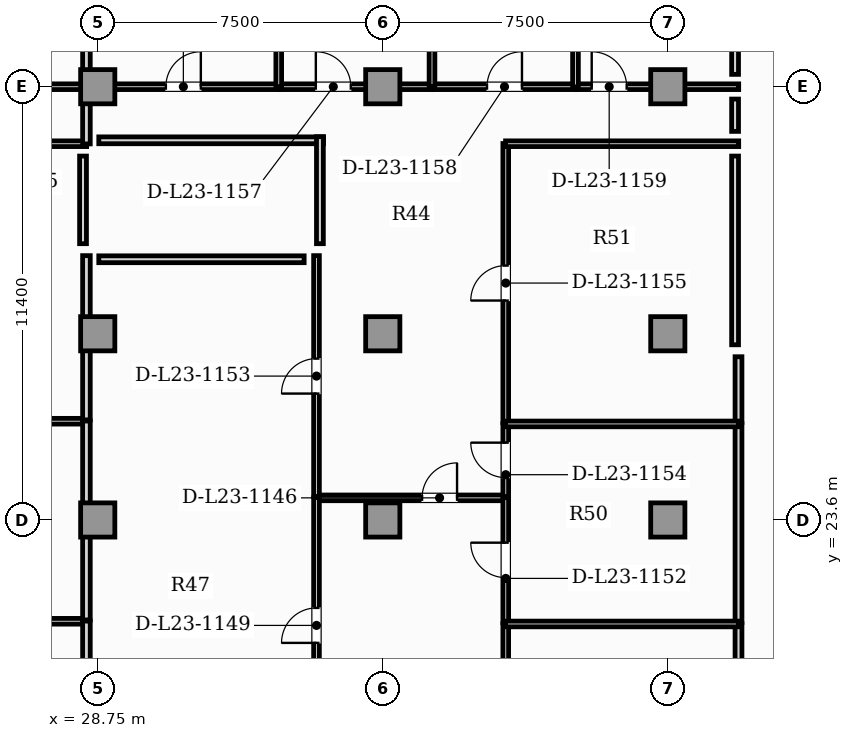
"""IFC4 building model, lengths in metres.
Left out: names, types, materials, properties, quantities, classifications, styles, units other than length and angle.
Written with IfcOpenShell. Run it as: python <this file> out.ifc"""

import sys

from ifc_helpers import new_model, si_unit, direction, frame, frame_2d, origin, origin_2d, place, context, subcontext, project, spatial, rectangle, extrude, element, fill, save


model = new_model("IFC4")
c1 = context("Model", 3, precision=1e-05, world=origin(), true_north=direction((0.0, 1.0)))
c2 = subcontext(c1, "Body", "Model", "MODEL_VIEW")
j1 = project(units=[si_unit("LENGTHUNIT", "METRE"), si_unit("PLANEANGLEUNIT", "RADIAN")], contexts=[c1])
p1 = place(None, origin())
s1 = spatial("IfcSite", under=j1, at=p1, CompositionType="ELEMENT")
p2 = place(p1, origin())
s2 = spatial("IfcBuilding", under=s1, at=p2, CompositionType="ELEMENT")
p3 = place(p2, frame((0.0, 0.0, 96.45)))
s3 = spatial("IfcBuildingStorey", under=s2, at=p3, CompositionType="ELEMENT", Elevation=96.45)
for number, where, z_axis, x_axis in (
    (1, (28.75, 23.6, 0.0), (0.0, 0.0, 1.0), (1.0, 0.0, 0.0)),
    (2, (36.25, 23.6, 0.0), (0.0, 0.0, 1.0), (1.0, 0.0, 0.0)),
    (3, (43.75, 23.6, 0.0), (0.0, 0.0, 1.0), (1.0, 0.0, 0.0)),
    (4, (28.75, 28.5, 0.0), (0.0, 0.0, 1.0), (1.0, 0.0, 0.0)),
    (5, (36.25, 28.5, 0.0), (0.0, 0.0, 1.0), (1.0, 0.0, 0.0)),
    (6, (43.75, 28.5, 0.0), (0.0, 0.0, 1.0), (1.0, 0.0, 0.0)),
    (7, (28.75, 35.0, 0.0), (0.0, 0.0, 1.0), (1.0, 0.0, 0.0)),
    (8, (36.25, 35.0, 0.0), (0.0, 0.0, 1.0), (1.0, 0.0, 0.0)),
    (9, (43.75, 35.0, 0.0), (0.0, 0.0, 1.0), (1.0, 0.0, 0.0)),
):
    element("IfcColumn", number, at=place(p3, frame(where, z_axis=z_axis, x_axis=x_axis)), inside=s3, PredefinedType="COLUMN", context=c2, shape_type="SweptSolid", body=[
        extrude(rectangle(XDim=0.9, YDim=0.9, at=origin_2d()), origin(), (0.0, 0.0, 1.0), 3.85),
    ])
for number, where, z_axis, x_axis in (
    (10, (45.61, 15.635, 0.0), (0.0, 0.0, 1.0), (0.0, 1.0, 0.0)),
    (11, (45.61, 20.899, 0.0), (0.0, 0.0, 1.0), (0.0, 1.0, 0.0)),
):
    element("IfcWall", number, at=place(p3, frame(where, z_axis=z_axis, x_axis=x_axis)), inside=s3, PredefinedType="PARTITIONING", context=c2, shape_type="SweptSolid", body=[
        extrude(rectangle(XDim=5.234, YDim=0.18, at=frame_2d((2.617, 0.0))), origin(), (0.0, 0.0, 1.0), 3.6),
    ])
p4 = place(p3, frame((45.61, 26.162, 0.0), z_axis=(0.0, 0.0, 1.0), x_axis=(0.0, 1.0, 0.0)))
e12 = element("IfcWall", 12, at=p4, inside=s3, PredefinedType="PARTITIONING", context=c2, shape_type="SweptSolid", body=[
    extrude(rectangle(XDim=1.733, YDim=0.18, at=frame_2d((0.866, 0.0))), origin(), (0.0, 0.0, 1.0), 3.6),
])
p5 = place(p3, frame((22.69, 33.5, 0.0), z_axis=(0.0, 0.0, 1.0), x_axis=(1.0, 0.0, 0.0)))
e13 = element("IfcWall", 13, at=p5, inside=s3, PredefinedType="PARTITIONING", context=c2, shape_type="SweptSolid", body=[
    extrude(rectangle(XDim=5.768, YDim=0.15, at=frame_2d((2.884, 0.0))), origin(), (0.0, 0.0, 1.0), 3.6),
])
p6 = place(p3, frame((24.931, 35.0, 0.0), z_axis=(0.0, 0.0, 1.0), x_axis=(1.0, 0.0, 0.0)))
e14 = element("IfcWall", 14, at=p6, inside=s3, PredefinedType="PARTITIONING", context=c2, shape_type="SweptSolid", body=[
    extrude(rectangle(XDim=3.527, YDim=0.15, at=frame_2d((1.764, 0.0))), origin(), (0.0, 0.0, 1.0), 2.983),
])
p7 = place(p6, frame((1.304, 0.0, 0.0)))
e15 = element("IfcOpeningElement", 15, at=p7, cuts=e14, PredefinedType="OPENING", context=c2, shape_type="SweptSolid", body=[
    extrude(rectangle(XDim=0.92, YDim=2.1, at=frame_2d((0.46, 1.05))), frame((0.0, 0.085, 0.0), z_axis=(0.0, -1.0, 0.0), x_axis=(1.0, 0.0, 0.0)), (0.0, 0.0, 1.0), 0.17),
])
p8 = place(p3, frame((28.453, 33.495, 0.0), z_axis=(0.0, 0.0, 1.0), x_axis=(0.0, 1.0, 0.0)))
e16 = element("IfcWall", 16, at=p8, inside=s3, PredefinedType="PARTITIONING", context=c2, shape_type="SweptSolid", body=[
    extrude(rectangle(XDim=1.51, YDim=0.2, at=frame_2d((0.755, 0.0))), origin(), (0.0, 0.0, 1.0), 3.6),
])
p9 = place(p3, frame((22.69, 20.935, 0.0), z_axis=(0.0, 0.0, 1.0), x_axis=(1.0, 0.0, 0.0)))
e17 = element("IfcWall", 17, at=p9, inside=s3, PredefinedType="PARTITIONING", context=c2, shape_type="SweptSolid", body=[
    extrude(rectangle(XDim=5.768, YDim=0.15, at=frame_2d((2.884, 0.0))), origin(), (0.0, 0.0, 1.0), 3.6),
])
p10 = place(p3, frame((28.453, 17.465, 0.0), z_axis=(0.0, 0.0, 1.0), x_axis=(0.0, 1.0, 0.0)))
e18 = element("IfcWall", 18, at=p10, inside=s3, PredefinedType="PARTITIONING", context=c2, shape_type="SweptSolid", body=[
    extrude(rectangle(XDim=3.475, YDim=0.2, at=frame_2d((1.737, 0.0))), origin(), (0.0, 0.0, 1.0), 3.6),
])
p11 = place(p3, frame((22.69, 26.198, 0.0), z_axis=(0.0, 0.0, 1.0), x_axis=(1.0, 0.0, 0.0)))
e19 = element("IfcWall", 19, at=p11, inside=s3, PredefinedType="PARTITIONING", context=c2, shape_type="SweptSolid", body=[
    extrude(rectangle(XDim=5.768, YDim=0.15, at=frame_2d((2.884, 0.0))), origin(), (0.0, 0.0, 1.0), 3.6),
])
p12 = place(p3, frame((28.453, 20.97, 0.0), z_axis=(0.0, 0.0, 1.0), x_axis=(0.0, 1.0, 0.0)))
e20 = element("IfcWall", 20, at=p12, inside=s3, PredefinedType="PARTITIONING", context=c2, shape_type="SweptSolid", body=[
    extrude(rectangle(XDim=5.234, YDim=0.2, at=frame_2d((2.617, 0.0))), origin(), (0.0, 0.0, 1.0), 3.6),
])
p13 = place(p3, frame((28.453, 26.234, 0.0), z_axis=(0.0, 0.0, 1.0), x_axis=(0.0, 1.0, 0.0)))
e21 = element("IfcWall", 21, at=p13, inside=s3, PredefinedType="PARTITIONING", context=c2, shape_type="SweptSolid", body=[
    extrude(rectangle(XDim=4.322, YDim=0.2, at=frame_2d((2.161, 0.0))), origin(), (0.0, 0.0, 1.0), 3.6),
])
p14 = place(p3, frame((28.453, 35.035, 0.0), z_axis=(0.0, 0.0, 1.0), x_axis=(0.0, 1.0, 0.0)))
e22 = element("IfcWall", 22, at=p14, inside=s3, PredefinedType="PARTITIONING", context=c2, shape_type="SweptSolid", body=[
    extrude(rectangle(XDim=7.955, YDim=0.2, at=frame_2d((3.978, 0.0))), origin(), (0.0, 0.0, 1.0), 3.6),
])
p15 = place(p3, frame((34.501, 24.182, 0.0), z_axis=(0.0, 0.0, 1.0), x_axis=(1.0, 0.0, 0.0)))
e23 = element("IfcWall", 23, at=p15, inside=s3, PredefinedType="PARTITIONING", context=c2, shape_type="SweptSolid", body=[
    extrude(rectangle(XDim=4.99, YDim=0.15, at=frame_2d((2.495, 0.0))), origin(), (0.0, 0.0, 1.0), 3.6),
])
p16 = place(p15, frame((2.783, 0.0, 0.0)))
e24 = element("IfcOpeningElement", 24, at=p16, cuts=e23, PredefinedType="OPENING", context=c2, shape_type="SweptSolid", body=[
    extrude(rectangle(XDim=0.92, YDim=2.1, at=frame_2d((0.46, 1.05))), frame((0.0, 0.085, 0.0), z_axis=(0.0, -1.0, 0.0), x_axis=(1.0, 0.0, 0.0)), (0.0, 0.0, 1.0), 0.17),
])
p17 = place(p3, frame((34.506, 17.465, 0.0), z_axis=(0.0, 0.0, 1.0), x_axis=(0.0, 1.0, 0.0)))
e25 = element("IfcWall", 25, at=p17, inside=s3, PredefinedType="PARTITIONING", context=c2, shape_type="SweptSolid", body=[
    extrude(rectangle(XDim=6.722, YDim=0.15, at=frame_2d((3.361, 0.0))), origin(), (0.0, 0.0, 1.0), 3.6),
])
p18 = place(p17, frame((2.901, 0.0, 0.0)))
e26 = element("IfcOpeningElement", 26, at=p18, cuts=e25, PredefinedType="OPENING", context=c2, shape_type="SweptSolid", body=[
    extrude(rectangle(XDim=0.92, YDim=2.1, at=frame_2d((0.46, 1.05))), frame((0.0, 0.085, 0.0), z_axis=(0.0, -1.0, 0.0), x_axis=(1.0, 0.0, 0.0)), (0.0, 0.0, 1.0), 0.17),
])
p19 = place(p3, frame((39.486, 15.635, 0.0), z_axis=(0.0, 0.0, 1.0), x_axis=(0.0, 1.0, 0.0)))
e27 = element("IfcWall", 27, at=p19, inside=s3, PredefinedType="PARTITIONING", context=c2, shape_type="SweptSolid", body=[
    extrude(rectangle(XDim=5.234, YDim=0.15, at=frame_2d((2.617, 0.0))), origin(), (0.0, 0.0, 1.0), 3.6),
])
p20 = place(p19, frame((2.157, 0.0, 0.0)))
e28 = element("IfcOpeningElement", 28, at=p20, cuts=e27, PredefinedType="OPENING", context=c2, shape_type="SweptSolid", body=[
    extrude(rectangle(XDim=0.92, YDim=2.1, at=frame_2d((0.46, 1.05))), frame((0.0, 0.085, 0.0), z_axis=(0.0, -1.0, 0.0), x_axis=(1.0, 0.0, 0.0)), (0.0, 0.0, 1.0), 0.17),
])
p21 = place(p3, frame((39.486, 20.899, 0.0), z_axis=(0.0, 0.0, 1.0), x_axis=(0.0, 1.0, 0.0)))
e29 = element("IfcWall", 29, at=p21, inside=s3, PredefinedType="PARTITIONING", context=c2, shape_type="SweptSolid", body=[
    extrude(rectangle(XDim=3.288, YDim=0.15, at=frame_2d((1.644, 0.0))), origin(), (0.0, 0.0, 1.0), 3.6),
])
p22 = place(p21, frame((1.184, 0.0, 0.0)))
e30 = element("IfcOpeningElement", 30, at=p22, cuts=e29, PredefinedType="OPENING", context=c2, shape_type="SweptSolid", body=[
    extrude(rectangle(XDim=0.92, YDim=2.1, at=frame_2d((0.46, 1.05))), frame((0.0, 0.085, 0.0), z_axis=(0.0, -1.0, 0.0), x_axis=(1.0, 0.0, 0.0)), (0.0, 0.0, 1.0), 0.17),
])
p23 = place(p3, frame((34.506, 24.217, 0.0), z_axis=(0.0, 0.0, 1.0), x_axis=(0.0, 1.0, 0.0)))
e31 = element("IfcWall", 31, at=p23, inside=s3, PredefinedType="PARTITIONING", context=c2, shape_type="SweptSolid", body=[
    extrude(rectangle(XDim=6.338, YDim=0.15, at=frame_2d((3.169, 0.0))), origin(), (0.0, 0.0, 1.0), 3.6),
])
p24 = place(p23, frame((2.709, 0.0, 0.0)))
e32 = element("IfcOpeningElement", 32, at=p24, cuts=e31, PredefinedType="OPENING", context=c2, shape_type="SweptSolid", body=[
    extrude(rectangle(XDim=0.92, YDim=2.1, at=frame_2d((0.46, 1.05))), frame((0.0, 0.085, 0.0), z_axis=(0.0, -1.0, 0.0), x_axis=(1.0, 0.0, 0.0)), (0.0, 0.0, 1.0), 0.17),
])
p25 = place(p3, frame((39.486, 24.217, 0.0), z_axis=(0.0, 0.0, 1.0), x_axis=(0.0, 1.0, 0.0)))
e33 = element("IfcWall", 33, at=p25, inside=s3, PredefinedType="PARTITIONING", context=c2, shape_type="SweptSolid", body=[
    extrude(rectangle(XDim=1.915, YDim=0.15, at=frame_2d((0.958, 0.0))), origin(), (0.0, 0.0, 1.0), 3.6),
])
p26 = place(p25, frame((0.498, 0.0, 0.0)))
e34 = element("IfcOpeningElement", 34, at=p26, cuts=e33, PredefinedType="OPENING", context=c2, shape_type="SweptSolid", body=[
    extrude(rectangle(XDim=0.92, YDim=2.1, at=frame_2d((0.46, 1.05))), frame((0.0, 0.085, 0.0), z_axis=(0.0, -1.0, 0.0), x_axis=(1.0, 0.0, 0.0)), (0.0, 0.0, 1.0), 0.17),
])
p27 = place(p3, frame((39.486, 26.162, 0.0), z_axis=(0.0, 0.0, 1.0), x_axis=(0.0, 1.0, 0.0)))
e35 = element("IfcWall", 35, at=p27, inside=s3, PredefinedType="PARTITIONING", context=c2, shape_type="SweptSolid", body=[
    extrude(rectangle(XDim=7.343, YDim=0.15, at=frame_2d((3.671, 0.0))), origin(), (0.0, 0.0, 1.0), 3.6),
])
p28 = place(p27, frame((3.211, 0.0, 0.0)))
e36 = element("IfcOpeningElement", 36, at=p28, cuts=e35, PredefinedType="OPENING", context=c2, shape_type="SweptSolid", body=[
    extrude(rectangle(XDim=0.92, YDim=2.1, at=frame_2d((0.46, 1.05))), frame((0.0, 0.085, 0.0), z_axis=(0.0, -1.0, 0.0), x_axis=(1.0, 0.0, 0.0)), (0.0, 0.0, 1.0), 0.17),
])
p29 = place(p3, frame((39.481, 33.5, 0.0), z_axis=(0.0, 0.0, 1.0), x_axis=(1.0, 0.0, 0.0)))
e37 = element("IfcWall", 37, at=p29, inside=s3, PredefinedType="PARTITIONING", context=c2, shape_type="SweptSolid", body=[
    extrude(rectangle(XDim=6.134, YDim=0.15, at=frame_2d((3.067, 0.0))), origin(), (0.0, 0.0, 1.0), 3.6),
])
p30 = place(p3, frame((28.488, 35.0, 0.0), z_axis=(0.0, 0.0, 1.0), x_axis=(1.0, 0.0, 0.0)))
e38 = element("IfcWall", 38, at=p30, inside=s3, PredefinedType="PARTITIONING", context=c2, shape_type="SweptSolid", body=[
    extrude(rectangle(XDim=5.03, YDim=0.15, at=frame_2d((2.515, 0.0))), origin(), (0.0, 0.0, 1.0), 2.983),
])
p31 = place(p30, frame((2.055, 0.0, 0.0)))
e39 = element("IfcOpeningElement", 39, at=p31, cuts=e38, PredefinedType="OPENING", context=c2, shape_type="SweptSolid", body=[
    extrude(rectangle(XDim=0.92, YDim=2.1, at=frame_2d((0.46, 1.05))), frame((0.0, 0.085, 0.0), z_axis=(0.0, -1.0, 0.0), x_axis=(1.0, 0.0, 0.0)), (0.0, 0.0, 1.0), 0.17),
])
p32 = place(p3, frame((33.548, 35.0, 0.0), z_axis=(0.0, 0.0, 1.0), x_axis=(1.0, 0.0, 0.0)))
e40 = element("IfcWall", 40, at=p32, inside=s3, PredefinedType="PARTITIONING", context=c2, shape_type="SweptSolid", body=[
    extrude(rectangle(XDim=4.002, YDim=0.15, at=frame_2d((2.001, 0.0))), origin(), (0.0, 0.0, 1.0), 2.983),
])
p33 = place(p32, frame((0.941, 0.0, 0.0)))
e41 = element("IfcOpeningElement", 41, at=p33, cuts=e40, PredefinedType="OPENING", context=c2, shape_type="SweptSolid", body=[
    extrude(rectangle(XDim=0.92, YDim=2.1, at=frame_2d((0.46, 1.05))), frame((0.0, 0.085, 0.0), z_axis=(0.0, -1.0, 0.0), x_axis=(1.0, 0.0, 0.0)), (0.0, 0.0, 1.0), 0.17),
])
p34 = place(p3, frame((37.58, 35.0, 0.0), z_axis=(0.0, 0.0, 1.0), x_axis=(1.0, 0.0, 0.0)))
e42 = element("IfcWall", 42, at=p34, inside=s3, PredefinedType="PARTITIONING", context=c2, shape_type="SweptSolid", body=[
    extrude(rectangle(XDim=3.746, YDim=0.15, at=frame_2d((1.873, 0.0))), origin(), (0.0, 0.0, 1.0), 2.983),
])
p35 = place(p34, frame((1.413, 0.0, 0.0)))
e43 = element("IfcOpeningElement", 43, at=p35, cuts=e42, PredefinedType="OPENING", context=c2, shape_type="SweptSolid", body=[
    extrude(rectangle(XDim=0.92, YDim=2.1, at=frame_2d((0.46, 1.05))), frame((0.0, 0.085, 0.0), z_axis=(0.0, -1.0, 0.0), x_axis=(1.0, 0.0, 0.0)), (0.0, 0.0, 1.0), 0.17),
])
p36 = place(p3, frame((41.356, 35.0, 0.0), z_axis=(0.0, 0.0, 1.0), x_axis=(1.0, 0.0, 0.0)))
e44 = element("IfcWall", 44, at=p36, inside=s3, PredefinedType="PARTITIONING", context=c2, shape_type="SweptSolid", body=[
    extrude(rectangle(XDim=4.259, YDim=0.15, at=frame_2d((2.13, 0.0))), origin(), (0.0, 0.0, 1.0), 2.983),
])
p37 = place(p36, frame((0.392, 0.0, 0.0)))
e45 = element("IfcOpeningElement", 45, at=p37, cuts=e44, PredefinedType="OPENING", context=c2, shape_type="SweptSolid", body=[
    extrude(rectangle(XDim=0.92, YDim=2.1, at=frame_2d((0.46, 1.05))), frame((0.0, 0.085, 0.0), z_axis=(0.0, -1.0, 0.0), x_axis=(1.0, 0.0, 0.0)), (0.0, 0.0, 1.0), 0.17),
])
for number, where, z_axis, x_axis in (
    (46, (39.481, 20.864, 0.0), (0.0, 0.0, 1.0), (1.0, 0.0, 0.0)),
    (47, (39.481, 26.127, 0.0), (0.0, 0.0, 1.0), (1.0, 0.0, 0.0)),
):
    element("IfcWall", number, at=place(p3, frame(where, z_axis=z_axis, x_axis=x_axis)), inside=s3, PredefinedType="PARTITIONING", context=c2, shape_type="SweptSolid", body=[
        extrude(rectangle(XDim=6.134, YDim=0.15, at=frame_2d((3.067, 0.0))), origin(), (0.0, 0.0, 1.0), 3.6),
    ])
for number, where, z_axis, x_axis in (
    (48, (33.513, 34.995, 0.0), (0.0, 0.0, 1.0), (0.0, 1.0, 0.0)),
    (49, (37.545, 34.995, 0.0), (0.0, 0.0, 1.0), (0.0, 1.0, 0.0)),
    (50, (41.321, 34.995, 0.0), (0.0, 0.0, 1.0), (0.0, 1.0, 0.0)),
):
    element("IfcWall", number, at=place(p3, frame(where, z_axis=z_axis, x_axis=x_axis)), inside=s3, PredefinedType="PARTITIONING", context=c2, shape_type="SweptSolid", body=[
        extrude(rectangle(XDim=7.995, YDim=0.15, at=frame_2d((3.998, 0.0))), origin(), (0.0, 0.0, 1.0), 3.6),
    ])
p38 = place(p3, frame((28.363, 33.175, 0.0), z_axis=(0.0, 0.0, 1.0), x_axis=(0.0, -1.0, 0.0)))
e51 = element("IfcWall", 51, at=p38, inside=s3, PredefinedType="PARTITIONING", context=c2, shape_type="SweptSolid", body=[
    extrude(rectangle(XDim=2.305, YDim=0.18, at=frame_2d((1.152, 0.0))), origin(), (0.0, 0.0, 1.0), 3.6),
])
p39 = place(p3, frame((34.691, 33.59, 0.0), z_axis=(0.0, 0.0, 1.0), x_axis=(-1.0, 0.0, 0.0)))
e52 = element("IfcWall", 52, at=p39, inside=s3, PredefinedType="PARTITIONING", context=c2, shape_type="SweptSolid", body=[
    extrude(rectangle(XDim=5.913, YDim=0.18, at=frame_2d((2.957, 0.0))), origin(), (0.0, 0.0, 1.0), 3.6),
])
p40 = place(p3, frame((45.52, 34.675, 0.0), z_axis=(0.0, 0.0, 1.0), x_axis=(0.0, -1.0, 0.0)))
e53 = element("IfcWall", 53, at=p40, inside=s3, PredefinedType="PARTITIONING", context=c2, shape_type="SweptSolid", body=[
    extrude(rectangle(XDim=0.85, YDim=0.18, at=frame_2d((0.425, 0.0))), origin(), (0.0, 0.0, 1.0), 3.6),
])
p41 = place(p3, frame((34.596, 30.87, 0.0), z_axis=(0.0, 0.0, 1.0), x_axis=(0.0, 1.0, 0.0)))
e54 = element("IfcWall", 54, at=p41, inside=s3, PredefinedType="PARTITIONING", context=c2, shape_type="SweptSolid", body=[
    extrude(rectangle(XDim=2.815, YDim=0.18, at=frame_2d((1.407, 0.0))), origin(), (0.0, 0.0, 1.0), 3.6),
])
p42 = place(p3, frame((28.778, 30.46, 0.0), z_axis=(0.0, 0.0, 1.0), x_axis=(1.0, 0.0, 0.0)))
e55 = element("IfcWall", 55, at=p42, inside=s3, PredefinedType="PARTITIONING", context=c2, shape_type="SweptSolid", body=[
    extrude(rectangle(XDim=5.403, YDim=0.18, at=frame_2d((2.702, 0.0))), origin(), (0.0, 0.0, 1.0), 3.6),
])
p43 = place(p3, frame((45.52, 33.175, 0.0), z_axis=(0.0, 0.0, 1.0), x_axis=(0.0, -1.0, 0.0)))
e56 = element("IfcWall", 56, at=p43, inside=s3, PredefinedType="PARTITIONING", context=c2, shape_type="SweptSolid", body=[
    extrude(rectangle(XDim=4.965, YDim=0.18, at=frame_2d((2.482, 0.0))), origin(), (0.0, 0.0, 1.0), 3.6),
])
p44 = place(p3, frame((45.52, 42.99, 0.0), z_axis=(0.0, 0.0, 1.0), x_axis=(0.0, -1.0, 0.0)))
e57 = element("IfcWall", 57, at=p44, inside=s3, PredefinedType="PARTITIONING", context=c2, shape_type="SweptSolid", body=[
    extrude(rectangle(XDim=7.665, YDim=0.18, at=frame_2d((3.833, 0.0))), origin(), (0.0, 0.0, 1.0), 3.6),
])
p45 = place(p16, origin())
e58 = element("IfcDoor", 58, at=p45, inside=s3, OperationType="SINGLE_SWING_RIGHT", PredefinedType="DOOR", context=c2, shape_type="SweptSolid", body=[
    extrude(rectangle(XDim=0.92, YDim=2.1, at=frame_2d((0.46, 1.05))), frame((0.0, 0.025, 0.0), z_axis=(0.0, -1.0, 0.0), x_axis=(1.0, 0.0, 0.0)), (0.0, 0.0, 1.0), 0.05),
])
fill(e24, e58)
p46 = place(p18, origin())
e59 = element("IfcDoor", 59, at=p46, inside=s3, OperationType="SINGLE_SWING_LEFT", PredefinedType="DOOR", context=c2, shape_type="SweptSolid", body=[
    extrude(rectangle(XDim=0.92, YDim=2.1, at=frame_2d((0.46, 1.05))), frame((0.0, 0.025, 0.0), z_axis=(0.0, -1.0, 0.0), x_axis=(1.0, 0.0, 0.0)), (0.0, 0.0, 1.0), 0.05),
])
fill(e26, e59)
p47 = place(p22, origin())
e60 = element("IfcDoor", 60, at=p47, inside=s3, OperationType="SINGLE_SWING_RIGHT", PredefinedType="DOOR", context=c2, shape_type="SweptSolid", body=[
    extrude(rectangle(XDim=0.92, YDim=2.1, at=frame_2d((0.46, 1.05))), frame((0.0, 0.025, 0.0), z_axis=(0.0, -1.0, 0.0), x_axis=(1.0, 0.0, 0.0)), (0.0, 0.0, 1.0), 0.05),
])
fill(e30, e60)
p48 = place(p24, origin())
e61 = element("IfcDoor", 61, at=p48, inside=s3, OperationType="SINGLE_SWING_LEFT", PredefinedType="DOOR", context=c2, shape_type="SweptSolid", body=[
    extrude(rectangle(XDim=0.92, YDim=2.1, at=frame_2d((0.46, 1.05))), frame((0.0, 0.025, 0.0), z_axis=(0.0, -1.0, 0.0), x_axis=(1.0, 0.0, 0.0)), (0.0, 0.0, 1.0), 0.05),
])
fill(e32, e61)
p49 = place(p26, origin())
e62 = element("IfcDoor", 62, at=p49, inside=s3, OperationType="SINGLE_SWING_RIGHT", PredefinedType="DOOR", context=c2, shape_type="SweptSolid", body=[
    extrude(rectangle(XDim=0.92, YDim=2.1, at=frame_2d((0.46, 1.05))), frame((0.0, 0.025, 0.0), z_axis=(0.0, -1.0, 0.0), x_axis=(1.0, 0.0, 0.0)), (0.0, 0.0, 1.0), 0.05),
])
fill(e34, e62)
p50 = place(p28, origin())
e63 = element("IfcDoor", 63, at=p50, inside=s3, OperationType="SINGLE_SWING_LEFT", PredefinedType="DOOR", context=c2, shape_type="SweptSolid", body=[
    extrude(rectangle(XDim=0.92, YDim=2.1, at=frame_2d((0.46, 1.05))), frame((0.0, 0.025, 0.0), z_axis=(0.0, -1.0, 0.0), x_axis=(1.0, 0.0, 0.0)), (0.0, 0.0, 1.0), 0.05),
])
fill(e36, e63)
p51 = place(p31, origin())
e64 = element("IfcDoor", 64, at=p51, inside=s3, OperationType="SINGLE_SWING_RIGHT", PredefinedType="DOOR", context=c2, shape_type="SweptSolid", body=[
    extrude(rectangle(XDim=0.92, YDim=2.1, at=frame_2d((0.46, 1.05))), frame((0.0, 0.025, 0.0), z_axis=(0.0, -1.0, 0.0), x_axis=(1.0, 0.0, 0.0)), (0.0, 0.0, 1.0), 0.05),
])
fill(e39, e64)
p52 = place(p33, origin())
e65 = element("IfcDoor", 65, at=p52, inside=s3, OperationType="SINGLE_SWING_LEFT", PredefinedType="DOOR", context=c2, shape_type="SweptSolid", body=[
    extrude(rectangle(XDim=0.92, YDim=2.1, at=frame_2d((0.46, 1.05))), frame((0.0, 0.025, 0.0), z_axis=(0.0, -1.0, 0.0), x_axis=(1.0, 0.0, 0.0)), (0.0, 0.0, 1.0), 0.05),
])
fill(e41, e65)
p53 = place(p35, origin())
e66 = element("IfcDoor", 66, at=p53, inside=s3, OperationType="SINGLE_SWING_RIGHT", PredefinedType="DOOR", context=c2, shape_type="SweptSolid", body=[
    extrude(rectangle(XDim=0.92, YDim=2.1, at=frame_2d((0.46, 1.05))), frame((0.0, 0.025, 0.0), z_axis=(0.0, -1.0, 0.0), x_axis=(1.0, 0.0, 0.0)), (0.0, 0.0, 1.0), 0.05),
])
fill(e43, e66)
p54 = place(p37, origin())
e67 = element("IfcDoor", 67, at=p54, inside=s3, OperationType="SINGLE_SWING_LEFT", PredefinedType="DOOR", context=c2, shape_type="SweptSolid", body=[
    extrude(rectangle(XDim=0.92, YDim=2.1, at=frame_2d((0.46, 1.05))), frame((0.0, 0.025, 0.0), z_axis=(0.0, -1.0, 0.0), x_axis=(1.0, 0.0, 0.0)), (0.0, 0.0, 1.0), 0.05),
])
fill(e45, e67)
save(model, sys.argv[1])
